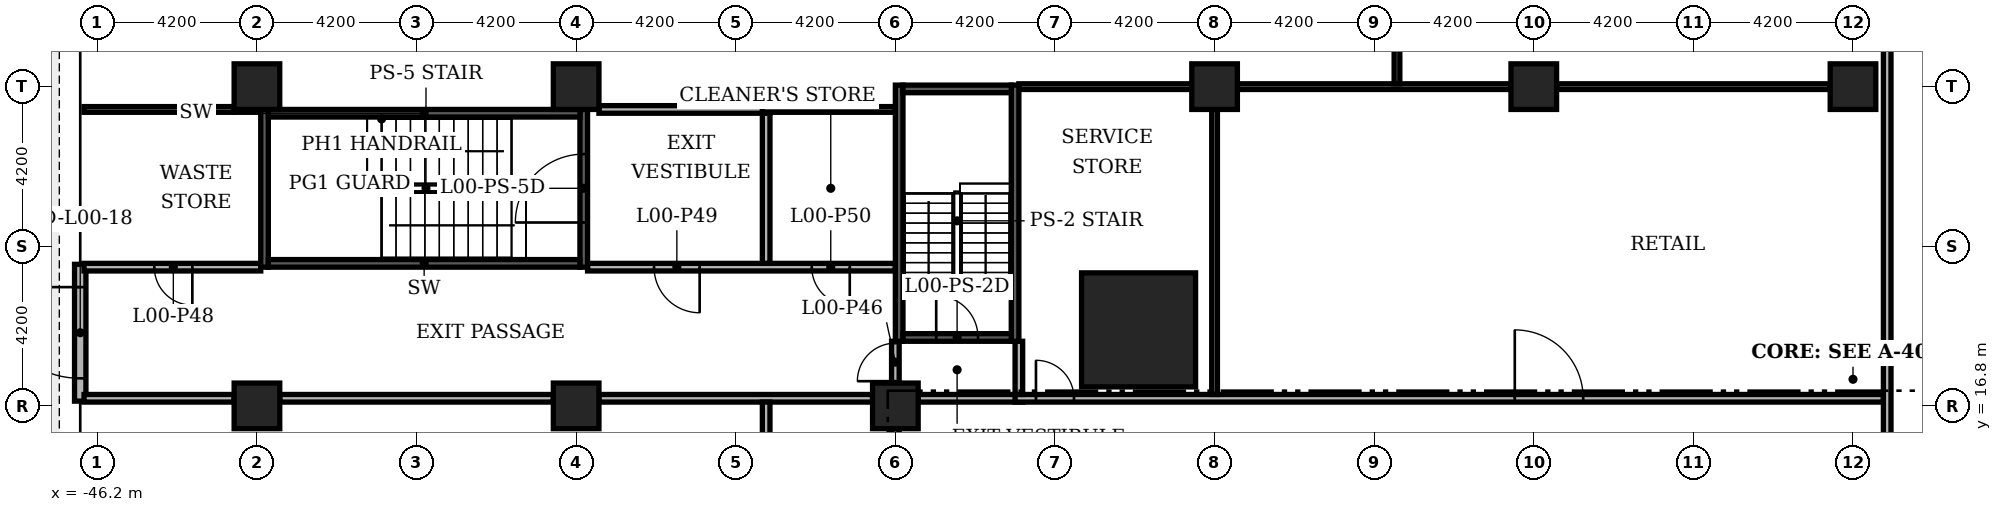
"""IFC4 building model, lengths in metres.
Left out: names, types, materials, properties, quantities, classifications, styles, units other than length and angle.
Written with IfcOpenShell. Run it as: python <this file> out.ifc"""

import sys

from ifc_helpers import new_model, si_unit, direction, frame, frame_2d, origin, origin_2d, place, context, subcontext, project, spatial, rectangle, extrude, element, fill, save


model = new_model("IFC4")
c1 = context("Model", 3, precision=1e-05, world=origin(), true_north=direction((0.0, 1.0)))
c2 = subcontext(c1, "Body", "Model", "MODEL_VIEW")
j1 = project(units=[si_unit("LENGTHUNIT", "METRE"), si_unit("PLANEANGLEUNIT", "RADIAN")], contexts=[c1])
p1 = place(None, origin())
s1 = spatial("IfcSite", under=j1, at=p1, CompositionType="ELEMENT")
p2 = place(p1, origin())
s2 = spatial("IfcBuilding", under=s1, at=p2, CompositionType="ELEMENT")
p3 = place(p2, origin())
s3 = spatial("IfcBuildingStorey", under=s2, at=p3, CompositionType="ELEMENT", Elevation=0.0)
p4 = place(p3, frame((-18.8, 18.8, 0.0), z_axis=(0.0, 0.0, 1.0), x_axis=(1.0, 0.0, 0.0)))
e1 = element("IfcColumn", 1, at=p4, inside=s3, PredefinedType="COLUMN", context=c2, shape_type="SweptSolid", body=[
    extrude(rectangle(XDim=3.0, YDim=3.0, at=origin_2d()), origin(), (0.0, 0.0, 1.0), 7.2),
])
for number, where, z_axis, x_axis in (
    (2, (0.0, 25.2, 0.0), (0.0, 0.0, 1.0), (1.0, 0.0, 0.0)),
    (3, (-8.4, 25.2, 0.0), (0.0, 0.0, 1.0), (1.0, 0.0, 0.0)),
    (4, (-16.8, 25.2, 0.0), (0.0, 0.0, 1.0), (1.0, 0.0, 0.0)),
    (5, (-25.2, 16.8, 0.0), (0.0, 0.0, 1.0), (1.0, 0.0, 0.0)),
    (6, (-33.6, 16.8, 0.0), (0.0, 0.0, 1.0), (1.0, 0.0, 0.0)),
    (7, (-33.6, 25.2, 0.0), (0.0, 0.0, 1.0), (1.0, 0.0, 0.0)),
    (8, (-42.0, 16.8, 0.0), (0.0, 0.0, 1.0), (1.0, 0.0, 0.0)),
    (9, (-42.0, 25.2, 0.0), (0.0, 0.0, 1.0), (1.0, 0.0, 0.0)),
):
    element("IfcColumn", number, at=place(p3, frame(where, z_axis=z_axis, x_axis=x_axis)), inside=s3, PredefinedType="COLUMN", context=c2, shape_type="SweptSolid", body=[
        extrude(rectangle(XDim=1.2, YDim=1.2, at=origin_2d()), origin(), (0.0, 0.0, 1.0), 7.2),
    ])
p5 = place(p3, frame((-46.65, 20.525, 0.0), z_axis=(0.0, 0.0, 1.0), x_axis=(0.0, -1.0, 0.0)))
e10 = element("IfcWall", 10, at=p5, inside=s3, PredefinedType="STANDARD", context=c2, shape_type="SweptSolid", body=[
    extrude(rectangle(XDim=3.6, YDim=0.3, at=frame_2d((1.8, 0.0))), origin(), (0.0, 0.0, 1.0), 6.78),
])
p6 = place(p5, frame((0.6, 0.0, 0.0)))
e11 = element("IfcOpeningElement", 11, at=p6, cuts=e10, PredefinedType="OPENING", context=c2, shape_type="SweptSolid", body=[
    extrude(rectangle(XDim=2.4, YDim=2.4, at=frame_2d((1.2, 1.2))), frame((0.0, 0.16, 0.0), z_axis=(0.0, -1.0, 0.0), x_axis=(1.0, 0.0, 0.0)), (0.0, 0.0, 1.0), 0.32),
])
p7 = place(p3, frame((-46.55, 17.0, 0.0), z_axis=(0.0, 0.0, 1.0), x_axis=(1.0, 0.0, 0.0)))
e12 = element("IfcWall", 12, at=p7, inside=s3, PredefinedType="PARTITIONING", context=c2, shape_type="SweptSolid", body=[
    extrude(rectangle(XDim=3.95, YDim=0.2, at=frame_2d((1.975, 0.0))), origin(), (0.0, 0.0, 1.0), 6.48),
])
for number, where, z_axis, x_axis in (
    (13, (-41.4, 17.0, 0.0), (0.0, 0.0, 1.0), (1.0, 0.0, 0.0)),
    (14, (-33.0, 17.0, 0.0), (0.0, 0.0, 1.0), (1.0, 0.0, 0.0)),
):
    element("IfcWall", number, at=place(p3, frame(where, z_axis=z_axis, x_axis=x_axis)), inside=s3, PredefinedType="PARTITIONING", context=c2, shape_type="SweptSolid", body=[
        extrude(rectangle(XDim=7.2, YDim=0.2, at=frame_2d((3.6, 0.0))), origin(), (0.0, 0.0, 1.0), 6.48),
    ])
p8 = place(p3, frame((-24.6, 17.0, 0.0), z_axis=(0.0, 0.0, 1.0), x_axis=(1.0, 0.0, 0.0)))
e15 = element("IfcWall", 15, at=p8, inside=s3, PredefinedType="PARTITIONING", context=c2, shape_type="SweptSolid", body=[
    extrude(rectangle(XDim=2.75, YDim=0.2, at=frame_2d((1.375, 0.0))), origin(), (0.0, 0.0, 1.0), 6.78),
])
p9 = place(p3, frame((-22.05, 17.0, 0.0), z_axis=(0.0, 0.0, 1.0), x_axis=(1.0, 0.0, 0.0)))
e16 = element("IfcWall", 16, at=p9, inside=s3, PredefinedType="PARTITIONING", context=c2, shape_type="SweptSolid", body=[
    extrude(rectangle(XDim=22.85, YDim=0.2, at=frame_2d((11.425, 0.0))), origin(), (0.0, 0.0, 1.0), 6.78),
])
p10 = place(p9, frame((0.55, 0.0, 0.0)))
e17 = element("IfcOpeningElement", 17, at=p10, cuts=e16, PredefinedType="OPENING", context=c2, shape_type="SweptSolid", body=[
    extrude(rectangle(XDim=1.0, YDim=2.1, at=frame_2d((0.5, 1.05))), frame((0.0, 0.11, 0.0), z_axis=(0.0, -1.0, 0.0), x_axis=(1.0, 0.0, 0.0)), (0.0, 0.0, 1.0), 0.22),
])
p11 = place(p9, frame((13.15, 0.0, 0.0)))
e18 = element("IfcOpeningElement", 18, at=p11, cuts=e16, PredefinedType="OPENING", context=c2, shape_type="SweptSolid", body=[
    extrude(rectangle(XDim=1.8, YDim=2.2, at=frame_2d((0.9, 1.1))), frame((0.0, 0.11, 0.0), z_axis=(0.0, -1.0, 0.0), x_axis=(1.0, 0.0, 0.0)), (0.0, 0.0, 1.0), 0.22),
])
p12 = place(p3, frame((-46.55, 20.45, 0.0), z_axis=(0.0, 0.0, 1.0), x_axis=(1.0, 0.0, 0.0)))
e19 = element("IfcWall", 19, at=p12, inside=s3, PredefinedType="PARTITIONING", context=c2, shape_type="SweptSolid", body=[
    extrude(rectangle(XDim=4.65, YDim=0.2, at=frame_2d((2.325, 0.0))), origin(), (0.0, 0.0, 1.0), 6.38),
])
p13 = place(p12, frame((1.85, 0.0, 0.0)))
e20 = element("IfcOpeningElement", 20, at=p13, cuts=e19, PredefinedType="OPENING", context=c2, shape_type="SweptSolid", body=[
    extrude(rectangle(XDim=1.0, YDim=2.1, at=frame_2d((0.5, 1.05))), frame((0.0, 0.11, 0.0), z_axis=(0.0, -1.0, 0.0), x_axis=(1.0, 0.0, 0.0)), (0.0, 0.0, 1.0), 0.22),
])
p14 = place(p3, frame((-33.3, 20.45, 0.0), z_axis=(0.0, 0.0, 1.0), x_axis=(1.0, 0.0, 0.0)))
e21 = element("IfcWall", 21, at=p14, inside=s3, PredefinedType="PARTITIONING", context=c2, shape_type="SweptSolid", body=[
    extrude(rectangle(XDim=8.1, YDim=0.2, at=frame_2d((4.05, 0.0))), origin(), (0.0, 0.0, 1.0), 6.78),
])
p15 = place(p14, frame((1.75, 0.0, 0.0)))
e22 = element("IfcOpeningElement", 22, at=p15, cuts=e21, PredefinedType="OPENING", context=c2, shape_type="SweptSolid", body=[
    extrude(rectangle(XDim=1.2, YDim=2.2, at=frame_2d((0.6, 1.1))), frame((0.0, 0.11, 0.0), z_axis=(0.0, -1.0, 0.0), x_axis=(1.0, 0.0, 0.0)), (0.0, 0.0, 1.0), 0.22),
])
p16 = place(p14, frame((5.9, 0.0, 0.0)))
e23 = element("IfcOpeningElement", 23, at=p16, cuts=e21, PredefinedType="OPENING", context=c2, shape_type="SweptSolid", body=[
    extrude(rectangle(XDim=1.0, YDim=2.1, at=frame_2d((0.5, 1.05))), frame((0.0, 0.11, 0.0), z_axis=(0.0, -1.0, 0.0), x_axis=(1.0, 0.0, 0.0)), (0.0, 0.0, 1.0), 0.22),
])
p17 = place(p3, frame((-46.55, 24.6, 0.0), z_axis=(0.0, 0.0, 1.0), x_axis=(1.0, 0.0, 0.0)))
e24 = element("IfcWall", 24, at=p17, inside=s3, PredefinedType="PARTITIONING", context=c2, shape_type="SweptSolid", body=[
    extrude(rectangle(XDim=3.95, YDim=0.15, at=frame_2d((1.975, 0.0))), origin(), (0.0, 0.0, 1.0), 6.78),
])
p18 = place(p3, frame((-42.6, 24.6, 0.0), z_axis=(0.0, 0.0, 1.0), x_axis=(1.0, 0.0, 0.0)))
e25 = element("IfcWall", 25, at=p18, inside=s3, PredefinedType="PARTITIONING", context=c2, shape_type="SweptSolid", body=[
    extrude(rectangle(XDim=0.7, YDim=0.15, at=frame_2d((0.35, 0.0))), origin(), (0.0, 0.0, 1.0), 6.78),
])
p19 = place(p3, frame((-33.0, 24.6, 0.0), z_axis=(0.0, 0.0, 1.0), x_axis=(1.0, 0.0, 0.0)))
e26 = element("IfcWall", 26, at=p19, inside=s3, PredefinedType="PARTITIONING", context=c2, shape_type="SweptSolid", body=[
    extrude(rectangle(XDim=4.5, YDim=0.2, at=frame_2d((2.25, 0.0))), origin(), (0.0, 0.0, 1.0), 6.78),
])
p20 = place(p3, frame((-28.7, 24.6, 0.0), z_axis=(0.0, 0.0, 1.0), x_axis=(1.0, 0.0, 0.0)))
e27 = element("IfcWall", 27, at=p20, inside=s3, PredefinedType="PARTITIONING", context=c2, shape_type="SweptSolid", body=[
    extrude(rectangle(XDim=3.5, YDim=0.15, at=frame_2d((1.75, 0.0))), origin(), (0.0, 0.0, 1.0), 6.78),
])
p21 = place(p3, frame((-21.95, 25.2, 0.0), z_axis=(0.0, 0.0, 1.0), x_axis=(1.0, 0.0, 0.0)))
e28 = element("IfcWall", 28, at=p21, inside=s3, PredefinedType="PARTITIONING", context=c2, shape_type="SweptSolid", body=[
    extrude(rectangle(XDim=4.55, YDim=0.15, at=frame_2d((2.275, 0.0))), origin(), (0.0, 0.0, 1.0), 6.48),
])
for number, where, z_axis, x_axis in (
    (29, (-16.2, 25.2, 0.0), (0.0, 0.0, 1.0), (1.0, 0.0, 0.0)),
    (30, (-7.8, 25.2, 0.0), (0.0, 0.0, 1.0), (1.0, 0.0, 0.0)),
):
    element("IfcWall", number, at=place(p3, frame(where, z_axis=z_axis, x_axis=x_axis)), inside=s3, PredefinedType="PARTITIONING", context=c2, shape_type="SweptSolid", body=[
        extrude(rectangle(XDim=7.2, YDim=0.15, at=frame_2d((3.6, 0.0))), origin(), (0.0, 0.0, 1.0), 6.48),
    ])
p22 = place(p3, frame((-28.6, -16.9, 0.0), z_axis=(0.0, 0.0, 1.0), x_axis=(0.0, 1.0, 0.0)))
e31 = element("IfcWall", 31, at=p22, inside=s3, PredefinedType="PARTITIONING", context=c2, shape_type="SweptSolid", body=[
    extrude(rectangle(XDim=33.8, YDim=0.2, at=frame_2d((16.9, 0.0))), origin(), (0.0, 0.0, 1.0), 6.48),
])
p23 = place(p22, frame((3.6, 0.0, 0.0)))
e32 = element("IfcOpeningElement", 32, at=p23, cuts=e31, PredefinedType="OPENING", context=c2, shape_type="SweptSolid", body=[
    extrude(rectangle(XDim=1.2, YDim=2.2, at=frame_2d((0.6, 1.1))), frame((0.0, 0.11, 0.0), z_axis=(0.0, -1.0, 0.0), x_axis=(1.0, 0.0, 0.0)), (0.0, 0.0, 1.0), 0.22),
])
p24 = place(p22, frame((12.1, 0.0, 0.0)))
e33 = element("IfcOpeningElement", 33, at=p24, cuts=e31, PredefinedType="OPENING", context=c2, shape_type="SweptSolid", body=[
    extrude(rectangle(XDim=1.2, YDim=2.2, at=frame_2d((0.6, 1.1))), frame((0.0, 0.11, 0.0), z_axis=(0.0, -1.0, 0.0), x_axis=(1.0, 0.0, 0.0)), (0.0, 0.0, 1.0), 0.22),
])
p25 = place(p22, frame((20.5, 0.0, 0.0)))
e34 = element("IfcOpeningElement", 34, at=p25, cuts=e31, PredefinedType="OPENING", context=c2, shape_type="SweptSolid", body=[
    extrude(rectangle(XDim=1.2, YDim=2.2, at=frame_2d((0.6, 1.1))), frame((0.0, 0.11, 0.0), z_axis=(0.0, -1.0, 0.0), x_axis=(1.0, 0.0, 0.0)), (0.0, 0.0, 1.0), 0.22),
])
p26 = place(p22, frame((29.0, 0.0, 0.0)))
e35 = element("IfcOpeningElement", 35, at=p26, cuts=e31, PredefinedType="OPENING", context=c2, shape_type="SweptSolid", body=[
    extrude(rectangle(XDim=1.2, YDim=2.2, at=frame_2d((0.6, 1.1))), frame((0.0, 0.11, 0.0), z_axis=(0.0, -1.0, 0.0), x_axis=(1.0, 0.0, 0.0)), (0.0, 0.0, 1.0), 0.22),
])
p27 = place(p3, frame((-28.6, 20.55, 0.0), z_axis=(0.0, 0.0, 1.0), x_axis=(0.0, 1.0, 0.0)))
e36 = element("IfcWall", 36, at=p27, inside=s3, PredefinedType="PARTITIONING", context=c2, shape_type="SweptSolid", body=[
    extrude(rectangle(XDim=3.95, YDim=0.2, at=frame_2d((1.975, 0.0))), origin(), (0.0, 0.0, 1.0), 6.78),
])
p28 = place(p3, frame((-25.2, 9.0, 0.0), z_axis=(0.0, 0.0, 1.0), x_axis=(0.0, 1.0, 0.0)))
e37 = element("IfcWall", 37, at=p28, inside=s3, PredefinedType="PARTITIONING", context=c2, shape_type="SweptSolid", body=[
    extrude(rectangle(XDim=7.2, YDim=0.2, at=frame_2d((3.6, 0.0))), origin(), (0.0, 0.0, 1.0), 6.48),
])
p29 = place(p28, frame((3.9, 0.0, 0.0)))
e38 = element("IfcOpeningElement", 38, at=p29, cuts=e37, PredefinedType="OPENING", context=c2, shape_type="SweptSolid", body=[
    extrude(rectangle(XDim=1.8, YDim=2.2, at=frame_2d((0.9, 1.1))), frame((0.0, 0.11, 0.0), z_axis=(0.0, -1.0, 0.0), x_axis=(1.0, 0.0, 0.0)), (0.0, 0.0, 1.0), 0.22),
])
p30 = place(p3, frame((-25.2, 17.4, 0.0), z_axis=(0.0, 0.0, 1.0), x_axis=(0.0, 1.0, 0.0)))
e39 = element("IfcWall", 39, at=p30, inside=s3, PredefinedType="PARTITIONING", context=c2, shape_type="SweptSolid", body=[
    extrude(rectangle(XDim=1.1, YDim=0.2, at=frame_2d((0.55, 0.0))), origin(), (0.0, 0.0, 1.0), 6.38),
])
p31 = place(p30, frame((0.05, 0.0, 0.0)))
e40 = element("IfcOpeningElement", 40, at=p31, cuts=e39, PredefinedType="OPENING", context=c2, shape_type="SweptSolid", body=[
    extrude(rectangle(XDim=1.0, YDim=2.2, at=frame_2d((0.5, 1.1))), frame((0.0, 0.11, 0.0), z_axis=(0.0, -1.0, 0.0), x_axis=(1.0, 0.0, 0.0)), (0.0, 0.0, 1.0), 0.22),
])
p32 = place(p3, frame((-21.95, 17.1, 0.0), z_axis=(0.0, 0.0, 1.0), x_axis=(0.0, 1.0, 0.0)))
e41 = element("IfcWall", 41, at=p32, inside=s3, PredefinedType="PARTITIONING", context=c2, shape_type="SweptSolid", body=[
    extrude(rectangle(XDim=1.4, YDim=0.2, at=frame_2d((0.7, 0.0))), origin(), (0.0, 0.0, 1.0), 6.78),
])
p33 = place(p3, frame((-16.8, 17.1, 0.0), z_axis=(0.0, 0.0, 1.0), x_axis=(0.0, 1.0, 0.0)))
e42 = element("IfcWall", 42, at=p33, inside=s3, PredefinedType="PARTITIONING", context=c2, shape_type="SweptSolid", body=[
    extrude(rectangle(XDim=7.5, YDim=0.15, at=frame_2d((3.75, 0.0))), origin(), (0.0, 0.0, 1.0), 6.78),
])
p34 = place(p3, frame((-12.0, 25.275, 0.0), z_axis=(0.0, 0.0, 1.0), x_axis=(0.0, 1.0, 0.0)))
e43 = element("IfcWall", 43, at=p34, inside=s3, PredefinedType="PARTITIONING", context=c2, shape_type="SweptSolid", body=[
    extrude(rectangle(XDim=12.65, YDim=0.15, at=frame_2d((6.325, 0.0))), origin(), (0.0, 0.0, 1.0), 6.48),
])
p35 = place(p34, frame((5.725, 0.0, 0.0)))
e44 = element("IfcOpeningElement", 44, at=p35, cuts=e43, PredefinedType="OPENING", context=c2, shape_type="SweptSolid", body=[
    extrude(rectangle(XDim=1.2, YDim=2.2, at=frame_2d((0.6, 1.1))), frame((0.0, 0.085, 0.0), z_axis=(0.0, -1.0, 0.0), x_axis=(1.0, 0.0, 0.0)), (0.0, 0.0, 1.0), 0.17),
])
p36 = place(p3, frame((0.9, 11.0, 0.0), z_axis=(0.0, 0.0, 1.0), x_axis=(0.0, 1.0, 0.0)))
e45 = element("IfcWall", 45, at=p36, inside=s3, PredefinedType="PARTITIONING", context=c2, shape_type="SweptSolid", body=[
    extrude(rectangle(XDim=35.55, YDim=0.2, at=frame_2d((17.775, 0.0))), origin(), (0.0, 0.0, 1.0), 6.48),
])
p37 = place(p3, frame((-25.1, 18.5, 0.0), z_axis=(0.0, 0.0, 1.0), x_axis=(0.0, 1.0, 0.0)))
e46 = element("IfcWall", 46, at=p37, inside=s3, PredefinedType="SOLIDWALL", context=c2, shape_type="SweptSolid", body=[
    extrude(rectangle(XDim=6.74, YDim=0.2, at=frame_2d((3.37, 0.0))), origin(), (0.0, 0.0, 1.0), 6.38),
])
p38 = place(p3, frame((-22.05, 18.5, 0.0), z_axis=(0.0, 0.0, 1.0), x_axis=(0.0, 1.0, 0.0)))
e47 = element("IfcWall", 47, at=p38, inside=s3, PredefinedType="SOLIDWALL", context=c2, shape_type="SweptSolid", body=[
    extrude(rectangle(XDim=6.74, YDim=0.2, at=frame_2d((3.37, 0.0))), origin(), (0.0, 0.0, 1.0), 6.78),
])
p39 = place(p3, frame((-25.0, 18.6, 0.0), z_axis=(0.0, 0.0, 1.0), x_axis=(1.0, 0.0, 0.0)))
e48 = element("IfcWall", 48, at=p39, inside=s3, PredefinedType="SOLIDWALL", context=c2, shape_type="SweptSolid", body=[
    extrude(rectangle(XDim=2.85, YDim=0.2, at=frame_2d((1.425, 0.0))), origin(), (0.0, 0.0, 1.0), 6.78),
])
p40 = place(p39, frame((0.875, 0.0, 0.0)))
e49 = element("IfcOpeningElement", 49, at=p40, cuts=e48, PredefinedType="OPENING", context=c2, shape_type="SweptSolid", body=[
    extrude(rectangle(XDim=1.1, YDim=2.2, at=frame_2d((0.55, 1.1))), frame((0.0, 0.11, 0.0), z_axis=(0.0, -1.0, 0.0), x_axis=(1.0, 0.0, 0.0)), (0.0, 0.0, 1.0), 0.22),
])
p41 = place(p3, frame((-25.0, 25.14, 0.0), z_axis=(0.0, 0.0, 1.0), x_axis=(1.0, 0.0, 0.0)))
e50 = element("IfcWall", 50, at=p41, inside=s3, PredefinedType="SOLIDWALL", context=c2, shape_type="SweptSolid", body=[
    extrude(rectangle(XDim=2.85, YDim=0.2, at=frame_2d((1.425, 0.0))), origin(), (0.0, 0.0, 1.0), 6.48),
])
p42 = place(p3, frame((-41.8, 20.45, 0.0), z_axis=(0.0, 0.0, 1.0), x_axis=(0.0, 1.0, 0.0)))
e51 = element("IfcWall", 51, at=p42, inside=s3, PredefinedType="SOLIDWALL", context=c2, shape_type="SweptSolid", body=[
    extrude(rectangle(XDim=4.15, YDim=0.2, at=frame_2d((2.075, 0.0))), origin(), (0.0, 0.0, 1.0), 6.38),
])
p43 = place(p3, frame((-33.4, 20.45, 0.0), z_axis=(0.0, 0.0, 1.0), x_axis=(0.0, 1.0, 0.0)))
e52 = element("IfcWall", 52, at=p43, inside=s3, PredefinedType="SOLIDWALL", context=c2, shape_type="SweptSolid", body=[
    extrude(rectangle(XDim=4.15, YDim=0.2, at=frame_2d((2.075, 0.0))), origin(), (0.0, 0.0, 1.0), 6.38),
])
p44 = place(p43, frame((1.175, 0.0, 0.0)))
e53 = element("IfcOpeningElement", 53, at=p44, cuts=e52, PredefinedType="OPENING", context=c2, shape_type="SweptSolid", body=[
    extrude(rectangle(XDim=1.8, YDim=2.2, at=frame_2d((0.9, 1.1))), frame((0.0, 0.11, 0.0), z_axis=(0.0, -1.0, 0.0), x_axis=(1.0, 0.0, 0.0)), (0.0, 0.0, 1.0), 0.22),
])
for number, where, z_axis, x_axis in (
    (54, (-41.7, 20.55, 0.0), (0.0, 0.0, 1.0), (1.0, 0.0, 0.0)),
    (55, (-41.7, 24.5, 0.0), (0.0, 0.0, 1.0), (1.0, 0.0, 0.0)),
):
    element("IfcWall", number, at=place(p3, frame(where, z_axis=z_axis, x_axis=x_axis)), inside=s3, PredefinedType="SOLIDWALL", context=c2, shape_type="SweptSolid", body=[
        extrude(rectangle(XDim=8.2, YDim=0.2, at=frame_2d((4.1, 0.0))), origin(), (0.0, 0.0, 1.0), 7.0),
    ])
p45 = place(p6, frame((2.4, 0.0, 0.0), z_axis=(0.0, 0.0, 1.0), x_axis=(-1.0, 0.0, 0.0)))
e56 = element("IfcDoor", 56, at=p45, inside=s3, OperationType="SINGLE_SWING_LEFT", PredefinedType="DOOR", context=c2, shape_type="SweptSolid", body=[
    extrude(rectangle(XDim=2.4, YDim=2.4, at=frame_2d((1.2, 1.2))), frame((0.0, 0.025, 0.0), z_axis=(0.0, -1.0, 0.0), x_axis=(1.0, 0.0, 0.0)), (0.0, 0.0, 1.0), 0.05),
])
fill(e11, e56)
p46 = place(p10, origin())
e57 = element("IfcDoor", 57, at=p46, inside=s3, OperationType="SINGLE_SWING_LEFT", PredefinedType="DOOR", context=c2, shape_type="SweptSolid", body=[
    extrude(rectangle(XDim=1.0, YDim=2.1, at=frame_2d((0.5, 1.05))), frame((0.0, 0.025, 0.0), z_axis=(0.0, -1.0, 0.0), x_axis=(1.0, 0.0, 0.0)), (0.0, 0.0, 1.0), 0.05),
])
fill(e17, e57)
p47 = place(p11, origin())
e58 = element("IfcDoor", 58, at=p47, inside=s3, OperationType="DOUBLE_DOOR_SINGLE_SWING", PredefinedType="DOOR", context=c2, shape_type="SweptSolid", body=[
    extrude(rectangle(XDim=1.8, YDim=2.2, at=frame_2d((0.9, 1.1))), frame((0.0, 0.025, 0.0), z_axis=(0.0, -1.0, 0.0), x_axis=(1.0, 0.0, 0.0)), (0.0, 0.0, 1.0), 0.05),
])
fill(e18, e58)
p48 = place(p31, origin())
e59 = element("IfcDoor", 59, at=p48, inside=s3, OperationType="SINGLE_SWING_LEFT", PredefinedType="DOOR", context=c2, shape_type="SweptSolid", body=[
    extrude(rectangle(XDim=1.0, YDim=2.2, at=frame_2d((0.5, 1.1))), frame((0.0, 0.025, 0.0), z_axis=(0.0, -1.0, 0.0), x_axis=(1.0, 0.0, 0.0)), (0.0, 0.0, 1.0), 0.05),
])
fill(e40, e59)
p49 = place(p13, origin())
e60 = element("IfcDoor", 60, at=p49, inside=s3, OperationType="SINGLE_SWING_RIGHT", PredefinedType="DOOR", context=c2, shape_type="SweptSolid", body=[
    extrude(rectangle(XDim=1.0, YDim=2.1, at=frame_2d((0.5, 1.05))), frame((0.0, 0.025, 0.0), z_axis=(0.0, -1.0, 0.0), x_axis=(1.0, 0.0, 0.0)), (0.0, 0.0, 1.0), 0.05),
])
fill(e20, e60)
p50 = place(p15, origin())
e61 = element("IfcDoor", 61, at=p50, inside=s3, OperationType="SINGLE_SWING_RIGHT", PredefinedType="DOOR", context=c2, shape_type="SweptSolid", body=[
    extrude(rectangle(XDim=1.2, YDim=2.2, at=frame_2d((0.6, 1.1))), frame((0.0, 0.025, 0.0), z_axis=(0.0, -1.0, 0.0), x_axis=(1.0, 0.0, 0.0)), (0.0, 0.0, 1.0), 0.05),
])
fill(e22, e61)
p51 = place(p16, origin())
e62 = element("IfcDoor", 62, at=p51, inside=s3, OperationType="SINGLE_SWING_RIGHT", PredefinedType="DOOR", context=c2, shape_type="SweptSolid", body=[
    extrude(rectangle(XDim=1.0, YDim=2.1, at=frame_2d((0.5, 1.05))), frame((0.0, 0.025, 0.0), z_axis=(0.0, -1.0, 0.0), x_axis=(1.0, 0.0, 0.0)), (0.0, 0.0, 1.0), 0.05),
])
fill(e23, e62)
p52 = place(p40, origin())
e63 = element("IfcDoor", 63, at=p52, inside=s3, OperationType="SINGLE_SWING_LEFT", PredefinedType="DOOR", context=c2, shape_type="SweptSolid", body=[
    extrude(rectangle(XDim=1.1, YDim=2.2, at=frame_2d((0.55, 1.1))), frame((0.0, 0.025, 0.0), z_axis=(0.0, -1.0, 0.0), x_axis=(1.0, 0.0, 0.0)), (0.0, 0.0, 1.0), 0.05),
])
fill(e49, e63)
p53 = place(p44, origin())
e64 = element("IfcDoor", 64, at=p53, inside=s3, OperationType="DOUBLE_DOOR_SINGLE_SWING", PredefinedType="DOOR", context=c2, shape_type="SweptSolid", body=[
    extrude(rectangle(XDim=1.8, YDim=2.2, at=frame_2d((0.9, 1.1))), frame((0.0, 0.025, 0.0), z_axis=(0.0, -1.0, 0.0), x_axis=(1.0, 0.0, 0.0)), (0.0, 0.0, 1.0), 0.05),
])
fill(e53, e64)
save(model, sys.argv[1])
